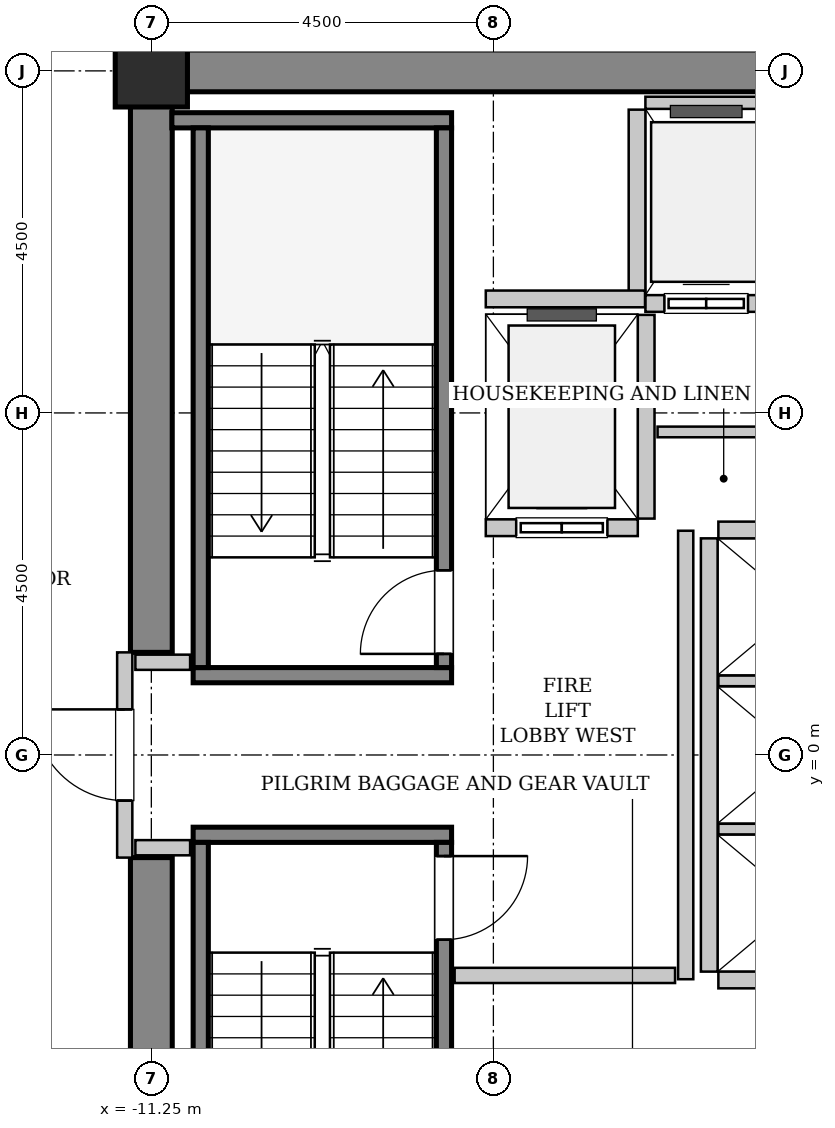
"""IFC4 building model, lengths in metres.
Left out: names, types, materials, properties, quantities, classifications, styles, units other than length and angle.
Written with IfcOpenShell. Run it as: python <this file> out.ifc"""

import sys

from ifc_helpers import new_model, si_unit, direction, frame, frame_2d, origin, origin_2d, place, context, subcontext, project, spatial, rectangle, hollow_rectangle, extrude, source, transform, mapped, element, fill, save


model = new_model("IFC4")
c1 = context("Model", 3, precision=1e-05, world=origin(), true_north=direction((0.0, 1.0)))
c2 = subcontext(c1, "Body", "Model", "MODEL_VIEW")
j1 = project(units=[si_unit("LENGTHUNIT", "METRE"), si_unit("PLANEANGLEUNIT", "RADIAN")], contexts=[c1])
p1 = place(None, origin())
s1 = spatial("IfcSite", under=j1, at=p1, CompositionType="ELEMENT")
p2 = place(p1, origin())
s2 = spatial("IfcBuilding", under=s1, at=p2, CompositionType="ELEMENT")
p3 = place(p2, frame((0.0, 0.0, 98.4)))
s3 = spatial("IfcBuildingStorey", under=s2, at=p3, CompositionType="ELEMENT", Elevation=98.4)
m1 = source(origin(), c2, "Body", "SweptSolid", [
    extrude(rectangle(XDim=9.975, YDim=0.55, at=frame_2d((4.987, 0.0))), origin(), (0.0, 0.0, 1.0), 3.8),
])
p4 = place(p3, frame((-11.525, 9.0, 0.0), z_axis=(0.0, 0.0, 1.0), x_axis=(1.0, 0.0, 0.0)))
e1 = element("IfcWall", 1, at=p4, inside=s3, PredefinedType="SHEAR", context=c2, shape_type="MappedRepresentation", body=[
    mapped(m1, transform((0.0, 0.0, 0.0), x_axis=(1.0, 0.0, 0.0), y_axis=(0.0, 1.0, 0.0), z_axis=(0.0, 0.0, 1.0), scale=1.0)),
])
m2 = source(origin(), c2, "Body", "SweptSolid", [
    extrude(rectangle(XDim=7.375, YDim=0.55, at=frame_2d((3.688, 0.0))), origin(), (0.0, 0.0, 1.0), 3.8),
])
for number, where, z_axis, x_axis in (
    (2, (-11.25, -8.725, 0.0), (0.0, 0.0, 1.0), (0.0, 1.0, 0.0)),
    (3, (-11.25, 1.35, 0.0), (0.0, 0.0, 1.0), (0.0, 1.0, 0.0)),
):
    element("IfcWall", number, at=place(p3, frame(where, z_axis=z_axis, x_axis=x_axis)), inside=s3, PredefinedType="SHEAR", context=c2, shape_type="MappedRepresentation", body=[
        mapped(m2, transform((0.0, 0.0, 0.0), x_axis=(1.0, 0.0, 0.0), y_axis=(0.0, 1.0, 0.0), z_axis=(0.0, 0.0, 1.0), scale=1.0)),
    ])
m3 = source(origin(), c2, "Body", "SweptSolid", [
    extrude(hollow_rectangle(XDim=0.95, YDim=0.95, WallThickness=0.045, InnerFilletRadius=0.045, OuterFilletRadius=0.09, at=origin_2d()), origin(), (0.0, 0.0, 1.0), 3.8),
])
p5 = place(p3, frame((-11.25, 9.0, 0.0), z_axis=(0.0, 0.0, 1.0), x_axis=(1.0, 0.0, 0.0)))
e4 = element("IfcColumn", 4, at=p5, inside=s3, PredefinedType="COLUMN", context=c2, shape_type="MappedRepresentation", body=[
    mapped(m3, transform((0.0, 0.0, 0.0), x_axis=(1.0, 0.0, 0.0), y_axis=(0.0, 1.0, 0.0), z_axis=(0.0, 0.0, 1.0), scale=1.0)),
])
m4 = source(origin(), c2, "Body", "SweptSolid", [
    extrude(rectangle(XDim=3.4, YDim=0.2, at=frame_2d((1.7, 0.0))), origin(), (0.0, 0.0, 1.0), 3.8),
])
p6 = place(p3, frame((-7.3, 1.05, 0.0), z_axis=(0.0, 0.0, 1.0), x_axis=(-1.0, 0.0, 0.0)))
e5 = element("IfcWall", 5, at=p6, inside=s3, PredefinedType="SOLIDWALL", context=c2, shape_type="MappedRepresentation", body=[
    mapped(m4, transform((0.0, 0.0, 0.0), x_axis=(1.0, 0.0, 0.0), y_axis=(0.0, 1.0, 0.0), z_axis=(0.0, 0.0, 1.0), scale=1.0)),
])
m5 = source(origin(), c2, "Body", "SweptSolid", [
    extrude(rectangle(XDim=3.68, YDim=0.2, at=frame_2d((1.84, 0.0))), origin(), (0.0, 0.0, 1.0), 3.8),
])
p7 = place(p3, frame((-7.3, 8.35, 0.0), z_axis=(0.0, 0.0, 1.0), x_axis=(-1.0, 0.0, 0.0)))
e6 = element("IfcWall", 6, at=p7, inside=s3, PredefinedType="SOLIDWALL", context=c2, shape_type="MappedRepresentation", body=[
    mapped(m5, transform((0.0, 0.0, 0.0), x_axis=(1.0, 0.0, 0.0), y_axis=(0.0, 1.0, 0.0), z_axis=(0.0, 0.0, 1.0), scale=1.0)),
])
m6 = source(origin(), c2, "Body", "SweptSolid", [
    extrude(rectangle(XDim=7.1, YDim=0.2, at=frame_2d((3.55, 0.0))), origin(), (0.0, 0.0, 1.0), 3.8),
])
p8 = place(p3, frame((-7.4, 1.15, 0.0), z_axis=(0.0, 0.0, 1.0), x_axis=(0.0, 1.0, 0.0)))
e7 = element("IfcWall", 7, at=p8, inside=s3, PredefinedType="SOLIDWALL", context=c2, shape_type="MappedRepresentation", body=[
    mapped(m6, transform((0.0, 0.0, 0.0), x_axis=(1.0, 0.0, 0.0), y_axis=(0.0, 1.0, 0.0), z_axis=(0.0, 0.0, 1.0), scale=1.0)),
])
p9 = place(p8, frame((0.18, 0.0, 0.0)))
e8 = element("IfcOpeningElement", 8, at=p9, cuts=e7, PredefinedType="OPENING", context=c2, shape_type="SweptSolid", body=[
    extrude(rectangle(XDim=1.1, YDim=2.15, at=frame_2d((0.55, 1.075))), frame((0.0, 0.11, 0.0), z_axis=(0.0, -1.0, 0.0), x_axis=(1.0, 0.0, 0.0)), (0.0, 0.0, 1.0), 0.22),
])
p10 = place(p3, frame((-10.6, 1.15, 0.0), z_axis=(0.0, 0.0, 1.0), x_axis=(0.0, 1.0, 0.0)))
e9 = element("IfcWall", 9, at=p10, inside=s3, PredefinedType="SOLIDWALL", context=c2, shape_type="MappedRepresentation", body=[
    mapped(m6, transform((0.0, 0.0, 0.0), x_axis=(1.0, 0.0, 0.0), y_axis=(0.0, 1.0, 0.0), z_axis=(0.0, 0.0, 1.0), scale=1.0)),
])
p11 = place(p3, frame((-10.7, -1.05, 0.0), z_axis=(0.0, 0.0, 1.0), x_axis=(1.0, 0.0, 0.0)))
e10 = element("IfcWall", 10, at=p11, inside=s3, PredefinedType="SOLIDWALL", context=c2, shape_type="MappedRepresentation", body=[
    mapped(m4, transform((0.0, 0.0, 0.0), x_axis=(1.0, 0.0, 0.0), y_axis=(0.0, 1.0, 0.0), z_axis=(0.0, 0.0, 1.0), scale=1.0)),
])
p12 = place(p3, frame((-10.6, -1.15, 0.0), z_axis=(0.0, 0.0, 1.0), x_axis=(0.0, -1.0, 0.0)))
e11 = element("IfcWall", 11, at=p12, inside=s3, PredefinedType="SOLIDWALL", context=c2, shape_type="MappedRepresentation", body=[
    mapped(m6, transform((0.0, 0.0, 0.0), x_axis=(1.0, 0.0, 0.0), y_axis=(0.0, 1.0, 0.0), z_axis=(0.0, 0.0, 1.0), scale=1.0)),
])
p13 = place(p3, frame((-7.4, -1.15, 0.0), z_axis=(0.0, 0.0, 1.0), x_axis=(0.0, -1.0, 0.0)))
e12 = element("IfcWall", 12, at=p13, inside=s3, PredefinedType="SOLIDWALL", context=c2, shape_type="MappedRepresentation", body=[
    mapped(m6, transform((0.0, 0.0, 0.0), x_axis=(1.0, 0.0, 0.0), y_axis=(0.0, 1.0, 0.0), z_axis=(0.0, 0.0, 1.0), scale=1.0)),
])
p14 = place(p13, frame((0.18, 0.0, 0.0)))
e13 = element("IfcOpeningElement", 13, at=p14, cuts=e12, PredefinedType="OPENING", context=c2, shape_type="SweptSolid", body=[
    extrude(rectangle(XDim=1.1, YDim=2.15, at=frame_2d((0.55, 1.075))), frame((0.0, 0.11, 0.0), z_axis=(0.0, -1.0, 0.0), x_axis=(1.0, 0.0, 0.0)), (0.0, 0.0, 1.0), 0.22),
])
m7 = source(origin(), c2, "Body", "SweptSolid", [
    extrude(rectangle(XDim=2.0, YDim=0.22, at=frame_2d((1.0, 0.0))), origin(), (0.0, 0.0, 1.0), 3.535),
])
p15 = place(p3, frame((-6.85, 2.99, 0.0), z_axis=(0.0, 0.0, 1.0), x_axis=(1.0, 0.0, 0.0)))
e14 = element("IfcWall", 14, at=p15, inside=s3, PredefinedType="SOLIDWALL", context=c2, shape_type="MappedRepresentation", body=[
    mapped(m7, transform((0.0, 0.0, 0.0), x_axis=(1.0, 0.0, 0.0), y_axis=(0.0, 1.0, 0.0), z_axis=(0.0, 0.0, 1.0), scale=1.0)),
])
p16 = place(p15, frame((0.4, 0.0, 0.0)))
e15 = element("IfcOpeningElement", 15, at=p16, cuts=e14, PredefinedType="OPENING", context=c2, shape_type="SweptSolid", body=[
    extrude(rectangle(XDim=1.2, YDim=2.2, at=frame_2d((0.6, 1.1))), frame((0.0, 0.12, 0.0), z_axis=(0.0, -1.0, 0.0), x_axis=(1.0, 0.0, 0.0)), (0.0, 0.0, 1.0), 0.24),
])
m8 = source(origin(), c2, "Body", "SweptSolid", [
    extrude(rectangle(XDim=2.68, YDim=0.22, at=frame_2d((1.34, 0.0))), origin(), (0.0, 0.0, 1.0), 3.535),
])
p17 = place(p3, frame((-4.74, 3.11, 0.0), z_axis=(0.0, 0.0, 1.0), x_axis=(0.0, 1.0, 0.0)))
e16 = element("IfcWall", 16, at=p17, inside=s3, PredefinedType="SOLIDWALL", context=c2, shape_type="MappedRepresentation", body=[
    mapped(m8, transform((0.0, 0.0, 0.0), x_axis=(1.0, 0.0, 0.0), y_axis=(0.0, 1.0, 0.0), z_axis=(0.0, 0.0, 1.0), scale=1.0)),
])
m9 = source(origin(), c2, "Body", "SweptSolid", [
    extrude(rectangle(XDim=3.2, YDim=0.22, at=frame_2d((1.6, 0.0))), origin(), (0.0, 0.0, 1.0), 3.535),
])
p18 = place(p3, frame((-4.75, 5.94, 0.0), z_axis=(0.0, 0.0, 1.0), x_axis=(1.0, 0.0, 0.0)))
e17 = element("IfcWall", 17, at=p18, inside=s3, PredefinedType="SOLIDWALL", context=c2, shape_type="MappedRepresentation", body=[
    mapped(m9, transform((0.0, 0.0, 0.0), x_axis=(1.0, 0.0, 0.0), y_axis=(0.0, 1.0, 0.0), z_axis=(0.0, 0.0, 1.0), scale=1.0)),
])
p19 = place(p18, frame((0.25, 0.0, 0.0)))
e18 = element("IfcOpeningElement", 18, at=p19, cuts=e17, PredefinedType="OPENING", context=c2, shape_type="SweptSolid", body=[
    extrude(rectangle(XDim=1.1, YDim=2.2, at=frame_2d((0.55, 1.1))), frame((0.0, 0.12, 0.0), z_axis=(0.0, -1.0, 0.0), x_axis=(1.0, 0.0, 0.0)), (0.0, 0.0, 1.0), 0.24),
])
p20 = place(p18, frame((1.875, 0.0, 0.0)))
e19 = element("IfcOpeningElement", 19, at=p20, cuts=e17, PredefinedType="OPENING", context=c2, shape_type="SweptSolid", body=[
    extrude(rectangle(XDim=1.1, YDim=2.2, at=frame_2d((0.55, 1.1))), frame((0.0, 0.12, 0.0), z_axis=(0.0, -1.0, 0.0), x_axis=(1.0, 0.0, 0.0)), (0.0, 0.0, 1.0), 0.24),
])
m10 = source(origin(), c2, "Body", "SweptSolid", [
    extrude(rectangle(XDim=3.2, YDim=0.16, at=frame_2d((1.6, 0.0))), origin(), (0.0, 0.0, 1.0), 2.425),
])
p21 = place(p3, frame((-1.55, 8.58, 0.0), z_axis=(0.0, 0.0, 1.0), x_axis=(-1.0, 0.0, 0.0)))
e20 = element("IfcWall", 20, at=p21, inside=s3, PredefinedType="PARTITIONING", context=c2, shape_type="MappedRepresentation", body=[
    mapped(m10, transform((0.0, 0.0, 0.0), x_axis=(1.0, 0.0, 0.0), y_axis=(0.0, 1.0, 0.0), z_axis=(0.0, 0.0, 1.0), scale=1.0)),
])
m11 = source(origin(), c2, "Body", "SweptSolid", [
    extrude(rectangle(XDim=2.43, YDim=0.22, at=frame_2d((1.215, 0.0))), origin(), (0.0, 0.0, 1.0), 3.535),
])
p22 = place(p3, frame((-4.86, 8.49, 0.0), z_axis=(0.0, 0.0, 1.0), x_axis=(0.0, -1.0, 0.0)))
e21 = element("IfcWall", 21, at=p22, inside=s3, PredefinedType="SOLIDWALL", context=c2, shape_type="MappedRepresentation", body=[
    mapped(m11, transform((0.0, 0.0, 0.0), x_axis=(1.0, 0.0, 0.0), y_axis=(0.0, 1.0, 0.0), z_axis=(0.0, 0.0, 1.0), scale=1.0)),
])
m12 = source(origin(), c2, "Body", "SweptSolid", [
    extrude(rectangle(XDim=5.7, YDim=0.22, at=frame_2d((2.85, 0.0))), origin(), (0.0, 0.0, 1.0), 3.535),
])
p23 = place(p3, frame((-3.91, 2.85, 0.0), z_axis=(0.0, 0.0, 1.0), x_axis=(0.0, -1.0, 0.0)))
e22 = element("IfcWall", 22, at=p23, inside=s3, PredefinedType="SOLIDWALL", context=c2, shape_type="MappedRepresentation", body=[
    mapped(m12, transform((0.0, 0.0, 0.0), x_axis=(1.0, 0.0, 0.0), y_axis=(0.0, 1.0, 0.0), z_axis=(0.0, 0.0, 1.0), scale=1.0)),
])
m13 = source(origin(), c2, "Body", "SweptSolid", [
    extrude(rectangle(XDim=2.13, YDim=0.22, at=frame_2d((1.065, 0.0))), origin(), (0.0, 0.0, 1.0), 3.535),
])
p24 = place(p3, frame((-3.79, -2.96, 0.0), z_axis=(0.0, 0.0, 1.0), x_axis=(1.0, 0.0, 0.0)))
e23 = element("IfcWall", 23, at=p24, inside=s3, PredefinedType="SOLIDWALL", context=c2, shape_type="MappedRepresentation", body=[
    mapped(m13, transform((0.0, 0.0, 0.0), x_axis=(1.0, 0.0, 0.0), y_axis=(0.0, 1.0, 0.0), z_axis=(0.0, 0.0, 1.0), scale=1.0)),
])
m14 = source(origin(), c2, "Body", "SweptSolid", [
    extrude(rectangle(XDim=2.13, YDim=0.14, at=frame_2d((1.065, 0.0))), origin(), (0.0, 0.0, 1.0), 3.535),
])
for number, where, z_axis, x_axis in (
    (24, (-3.79, -0.975, 0.0), (0.0, 0.0, 1.0), (1.0, 0.0, 0.0)),
    (25, (-3.79, 0.975, 0.0), (0.0, 0.0, 1.0), (1.0, 0.0, 0.0)),
):
    element("IfcWall", number, at=place(p3, frame(where, z_axis=z_axis, x_axis=x_axis)), inside=s3, PredefinedType="PARTITIONING", context=c2, shape_type="MappedRepresentation", body=[
        mapped(m14, transform((0.0, 0.0, 0.0), x_axis=(1.0, 0.0, 0.0), y_axis=(0.0, 1.0, 0.0), z_axis=(0.0, 0.0, 1.0), scale=1.0)),
    ])
p25 = place(p3, frame((-1.66, 2.96, 0.0), z_axis=(0.0, 0.0, 1.0), x_axis=(-1.0, 0.0, 0.0)))
e26 = element("IfcWall", 26, at=p25, inside=s3, PredefinedType="SOLIDWALL", context=c2, shape_type="MappedRepresentation", body=[
    mapped(m13, transform((0.0, 0.0, 0.0), x_axis=(1.0, 0.0, 0.0), y_axis=(0.0, 1.0, 0.0), z_axis=(0.0, 0.0, 1.0), scale=1.0)),
])
m15 = source(origin(), c2, "Body", "SweptSolid", [
    extrude(rectangle(XDim=2.095, YDim=0.22, at=frame_2d((1.048, 0.0))), origin(), (0.0, 0.0, 1.0), 3.535),
])
p26 = place(p3, frame((-6.85, 6.0, 0.0), z_axis=(0.0, 0.0, 1.0), x_axis=(1.0, 0.0, 0.0)))
e27 = element("IfcWall", 27, at=p26, inside=s3, PredefinedType="SOLIDWALL", context=c2, shape_type="MappedRepresentation", body=[
    mapped(m15, transform((0.0, 0.0, 0.0), x_axis=(1.0, 0.0, 0.0), y_axis=(0.0, 1.0, 0.0), z_axis=(0.0, 0.0, 1.0), scale=1.0)),
])
m16 = source(origin(), c2, "Body", "SweptSolid", [
    extrude(rectangle(XDim=2.7, YDim=0.2, at=frame_2d((1.35, 0.0))), origin(), (0.0, 0.0, 1.0), 2.425),
])
p27 = place(p3, frame((-11.6, -1.35, 0.0), z_axis=(0.0, 0.0, 1.0), x_axis=(0.0, 1.0, 0.0)))
e28 = element("IfcWall", 28, at=p27, inside=s3, PredefinedType="PARTITIONING", context=c2, shape_type="MappedRepresentation", body=[
    mapped(m16, transform((0.0, 0.0, 0.0), x_axis=(1.0, 0.0, 0.0), y_axis=(0.0, 1.0, 0.0), z_axis=(0.0, 0.0, 1.0), scale=1.0)),
])
p28 = place(p27, frame((0.75, 0.0, 0.0)))
e29 = element("IfcOpeningElement", 29, at=p28, cuts=e28, PredefinedType="OPENING", context=c2, shape_type="SweptSolid", body=[
    extrude(rectangle(XDim=1.2, YDim=2.15, at=frame_2d((0.6, 1.075))), frame((0.0, 0.11, 0.0), z_axis=(0.0, -1.0, 0.0), x_axis=(1.0, 0.0, 0.0)), (0.0, 0.0, 1.0), 0.22),
])
m17 = source(origin(), c2, "Body", "SweptSolid", [
    extrude(rectangle(XDim=5.9, YDim=0.2, at=frame_2d((2.95, 0.0))), origin(), (0.0, 0.0, 1.0), 3.535),
])
p29 = place(p3, frame((-4.22, -2.95, 0.0), z_axis=(0.0, 0.0, 1.0), x_axis=(0.0, 1.0, 0.0)))
e30 = element("IfcWall", 30, at=p29, inside=s3, PredefinedType="PARTITIONING", context=c2, shape_type="MappedRepresentation", body=[
    mapped(m17, transform((0.0, 0.0, 0.0), x_axis=(1.0, 0.0, 0.0), y_axis=(0.0, 1.0, 0.0), z_axis=(0.0, 0.0, 1.0), scale=1.0)),
])
m18 = source(origin(), c2, "Body", "SweptSolid", [
    extrude(rectangle(XDim=2.9, YDim=0.2, at=frame_2d((1.45, 0.0))), origin(), (0.0, 0.0, 1.0), 3.535),
])
p30 = place(p3, frame((-7.26, -2.9, 0.0), z_axis=(0.0, 0.0, 1.0), x_axis=(1.0, 0.0, 0.0)))
e31 = element("IfcWall", 31, at=p30, inside=s3, PredefinedType="PARTITIONING", context=c2, shape_type="MappedRepresentation", body=[
    mapped(m18, transform((0.0, 0.0, 0.0), x_axis=(1.0, 0.0, 0.0), y_axis=(0.0, 1.0, 0.0), z_axis=(0.0, 0.0, 1.0), scale=1.0)),
])
m19 = source(origin(), c2, "Body", "SweptSolid", [
    extrude(rectangle(XDim=0.72, YDim=0.2, at=frame_2d((0.36, 0.0))), origin(), (0.0, 0.0, 1.0), 3.535),
])
for number, where, z_axis, x_axis in (
    (32, (-11.46, 1.22, 0.0), (0.0, 0.0, 1.0), (1.0, 0.0, 0.0)),
    (33, (-11.46, -1.22, 0.0), (0.0, 0.0, 1.0), (1.0, 0.0, 0.0)),
):
    element("IfcWall", number, at=place(p3, frame(where, z_axis=z_axis, x_axis=x_axis)), inside=s3, PredefinedType="PARTITIONING", context=c2, shape_type="MappedRepresentation", body=[
        mapped(m19, transform((0.0, 0.0, 0.0), x_axis=(1.0, 0.0, 0.0), y_axis=(0.0, 1.0, 0.0), z_axis=(0.0, 0.0, 1.0), scale=1.0)),
    ])
m20 = source(origin(), c2, "Body", "SweptSolid", [
    extrude(rectangle(XDim=2.95, YDim=0.14, at=frame_2d((1.475, 0.0))), origin(), (0.0, 0.0, 1.0), 3.535),
])
p31 = place(p3, frame((-4.59, 4.25, 0.0), z_axis=(0.0, 0.0, 1.0), x_axis=(1.0, 0.0, 0.0)))
e34 = element("IfcWall", 34, at=p31, inside=s3, PredefinedType="PARTITIONING", context=c2, shape_type="MappedRepresentation", body=[
    mapped(m20, transform((0.0, 0.0, 0.0), x_axis=(1.0, 0.0, 0.0), y_axis=(0.0, 1.0, 0.0), z_axis=(0.0, 0.0, 1.0), scale=1.0)),
])
m21 = source(origin(), c2, "Body", "SweptSolid", [
    extrude(rectangle(XDim=1.1, YDim=2.15, at=frame_2d((0.55, 1.075))), frame((0.0, 0.025, 0.0), z_axis=(0.0, -1.0, 0.0), x_axis=(1.0, 0.0, 0.0)), (0.0, 0.0, 1.0), 0.05),
])
p32 = place(p9, origin())
e35 = element("IfcDoor", 35, at=p32, inside=s3, OperationType="SINGLE_SWING_LEFT", PredefinedType="DOOR", context=c2, shape_type="MappedRepresentation", body=[
    mapped(m21, transform((0.0, 0.0, 0.0), x_axis=(1.0, 0.0, 0.0), y_axis=(0.0, 1.0, 0.0), z_axis=(0.0, 0.0, 1.0), scale=1.0)),
])
fill(e8, e35)
p33 = place(p14, origin())
e36 = element("IfcDoor", 36, at=p33, inside=s3, OperationType="SINGLE_SWING_LEFT", PredefinedType="DOOR", context=c2, shape_type="MappedRepresentation", body=[
    mapped(m21, transform((0.0, 0.0, 0.0), x_axis=(1.0, 0.0, 0.0), y_axis=(0.0, 1.0, 0.0), z_axis=(0.0, 0.0, 1.0), scale=1.0)),
])
fill(e13, e36)
m22 = source(origin(), c2, "Body", "SweptSolid", [
    extrude(rectangle(XDim=1.2, YDim=2.2, at=frame_2d((0.6, 1.1))), frame((0.0, 0.025, 0.0), z_axis=(0.0, -1.0, 0.0), x_axis=(1.0, 0.0, 0.0)), (0.0, 0.0, 1.0), 0.05),
])
p34 = place(p16, origin())
e37 = element("IfcDoor", 37, at=p34, inside=s3, OperationType="SLIDING_TO_LEFT", PredefinedType="DOOR", context=c2, shape_type="MappedRepresentation", body=[
    mapped(m22, transform((0.0, 0.0, 0.0), x_axis=(1.0, 0.0, 0.0), y_axis=(0.0, 1.0, 0.0), z_axis=(0.0, 0.0, 1.0), scale=1.0)),
])
fill(e15, e37)
m23 = source(origin(), c2, "Body", "SweptSolid", [
    extrude(rectangle(XDim=1.1, YDim=2.2, at=frame_2d((0.55, 1.1))), frame((0.0, 0.025, 0.0), z_axis=(0.0, -1.0, 0.0), x_axis=(1.0, 0.0, 0.0)), (0.0, 0.0, 1.0), 0.05),
])
p35 = place(p19, origin())
e38 = element("IfcDoor", 38, at=p35, inside=s3, OperationType="DOUBLE_DOOR_SLIDING", PredefinedType="DOOR", context=c2, shape_type="MappedRepresentation", body=[
    mapped(m23, transform((0.0, 0.0, 0.0), x_axis=(1.0, 0.0, 0.0), y_axis=(0.0, 1.0, 0.0), z_axis=(0.0, 0.0, 1.0), scale=1.0)),
])
fill(e18, e38)
m24 = source(origin(), c2, "Body", "SweptSolid", [
    extrude(rectangle(XDim=1.2, YDim=2.15, at=frame_2d((0.6, 1.075))), frame((0.0, 0.025, 0.0), z_axis=(0.0, -1.0, 0.0), x_axis=(1.0, 0.0, 0.0)), (0.0, 0.0, 1.0), 0.05),
])
p36 = place(p28, origin())
e39 = element("IfcDoor", 39, at=p36, inside=s3, OperationType="SINGLE_SWING_RIGHT", PredefinedType="DOOR", context=c2, shape_type="MappedRepresentation", body=[
    mapped(m24, transform((0.0, 0.0, 0.0), x_axis=(1.0, 0.0, 0.0), y_axis=(0.0, 1.0, 0.0), z_axis=(0.0, 0.0, 1.0), scale=1.0)),
])
fill(e29, e39)
save(model, sys.argv[1])
